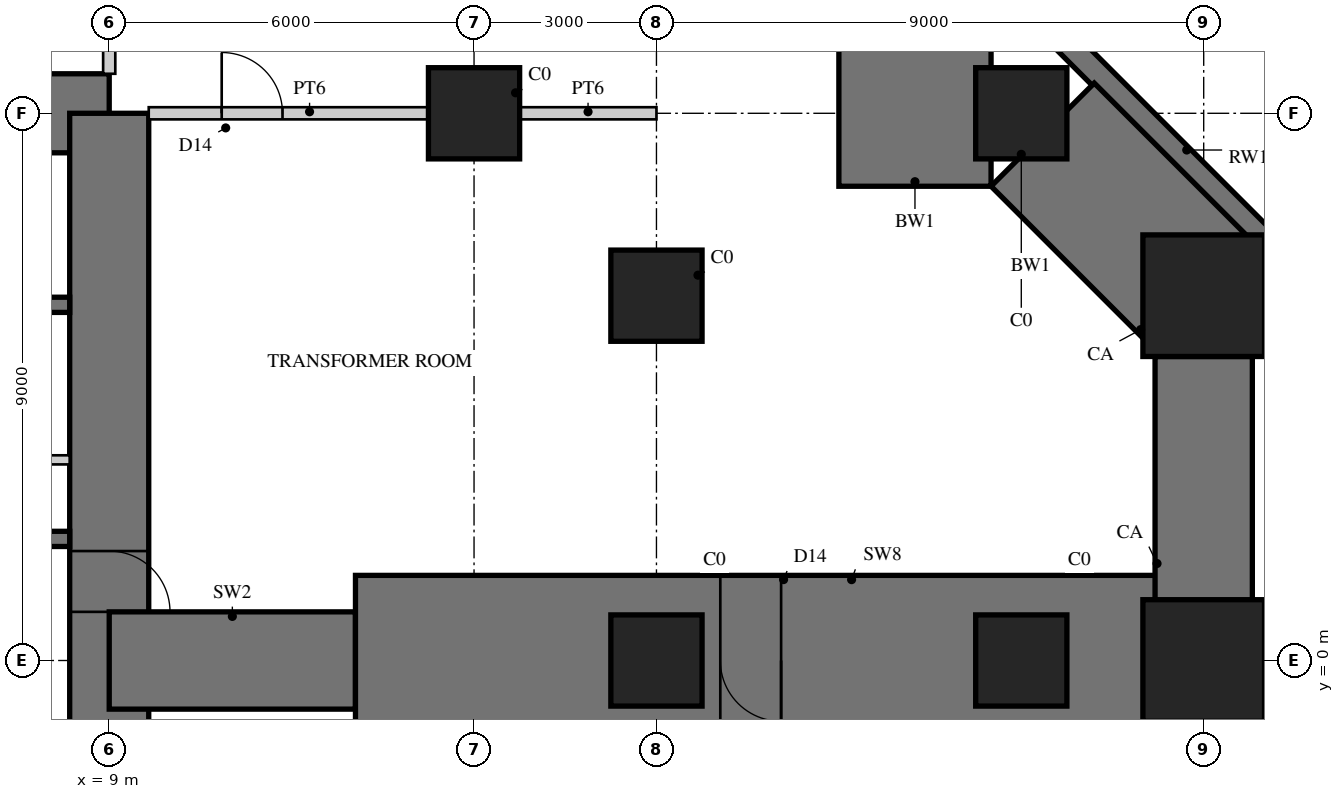
"""IFC4 building model, lengths in metres.
Left out: names, types, materials, properties, quantities, classifications, styles, units other than length and angle.
Written with IfcOpenShell. Run it as: python <this file> out.ifc"""

import sys

from ifc_helpers import new_model, si_unit, direction, frame, frame_2d, origin, origin_2d, place, context, subcontext, project, spatial, polyline, rectangle, outline, extrude, element, fill, save


model = new_model("IFC4")
c1 = context("Model", 3, precision=1e-05, world=origin(), true_north=direction((0.0, 1.0)))
c2 = subcontext(c1, "Body", "Model", "MODEL_VIEW")
j1 = project(units=[si_unit("LENGTHUNIT", "METRE"), si_unit("PLANEANGLEUNIT", "RADIAN")], contexts=[c1])
p1 = place(None, origin())
s1 = spatial("IfcSite", under=j1, at=p1, CompositionType="ELEMENT")
p2 = place(p1, origin())
s2 = spatial("IfcBuilding", under=s1, at=p2, CompositionType="ELEMENT")
p3 = place(p2, frame((0.0, 0.0, -8.0)))
s3 = spatial("IfcBuildingStorey", under=s2, at=p3, CompositionType="ELEMENT", Elevation=-8.0)
p4 = place(p3, origin())
e1 = element("IfcWall", 1, at=p4, inside=s3, PredefinedType="SOLIDWALL", context=c2, shape_type="SweptSolid", body=[
    extrude(outline(polyline([(24.476, 10.15), (24.642, 10.55), (28.55, 6.642), (28.15, 6.476), (24.476, 10.15)])), origin(), (0.0, 0.0, 1.0), 4.0),
])
p5 = place(p3, frame((9.0, 9.0, 0.0), z_axis=(0.0, 0.0, 1.0), x_axis=(-1.0, 0.0, 0.0)))
e2 = element("IfcWall", 2, at=p5, inside=s3, PredefinedType="SHEAR", context=c2, shape_type="SweptSolid", body=[
    extrude(rectangle(XDim=18.0, YDim=1.3, at=frame_2d((9.0, 0.0))), origin(), (0.0, 0.0, 1.0), 4.0),
])
p6 = place(p5, frame((9.8, 0.0, 0.0)))
e3 = element("IfcOpeningElement", 3, at=p6, cuts=e2, PredefinedType="OPENING", context=c2, shape_type="SweptSolid", body=[
    extrude(rectangle(XDim=1.0, YDim=2.4, at=frame_2d((0.5, 1.2))), frame((0.0, 0.66, 0.0), z_axis=(0.0, -1.0, 0.0), x_axis=(1.0, 0.0, 0.0)), (0.0, 0.0, 1.0), 1.32),
])
p7 = place(p3, frame((9.0, -9.0, 0.0), z_axis=(0.0, 0.0, 1.0), x_axis=(0.0, 1.0, 0.0)))
e4 = element("IfcWall", 4, at=p7, inside=s3, PredefinedType="SHEAR", context=c2, shape_type="SweptSolid", body=[
    extrude(rectangle(XDim=18.0, YDim=1.3, at=frame_2d((9.0, 0.0))), origin(), (0.0, 0.0, 1.0), 4.0),
])
p8 = place(p7, frame((9.8, 0.0, 0.0)))
e5 = element("IfcOpeningElement", 5, at=p8, cuts=e4, PredefinedType="OPENING", context=c2, shape_type="SweptSolid", body=[
    extrude(rectangle(XDim=1.0, YDim=2.4, at=frame_2d((0.5, 1.2))), frame((0.0, 0.66, 0.0), z_axis=(0.0, -1.0, 0.0), x_axis=(1.0, 0.0, 0.0)), (0.0, 0.0, 1.0), 1.32),
])
for number, where, z_axis, x_axis in (
    (6, (1.925, 2.0, 0.0), (0.0, 0.0, 1.0), (1.0, 0.0, 0.0)),
    (7, (1.925, 5.85, 0.0), (0.0, 0.0, 1.0), (1.0, 0.0, 0.0)),
):
    element("IfcWall", number, at=place(p3, frame(where, z_axis=z_axis, x_axis=x_axis)), inside=s3, PredefinedType="SHEAR", context=c2, shape_type="SweptSolid", body=[
        extrude(rectangle(XDim=6.425, YDim=0.25, at=frame_2d((3.212, 0.0))), origin(), (0.0, 0.0, 1.0), 4.0),
    ])
p9 = place(p3, frame((1.925, 3.3, 0.0), z_axis=(0.0, 0.0, 1.0), x_axis=(1.0, 0.0, 0.0)))
e8 = element("IfcWall", 8, at=p9, inside=s3, PredefinedType="PARTITIONING", context=c2, shape_type="SweptSolid", body=[
    extrude(rectangle(XDim=6.425, YDim=0.15, at=frame_2d((3.212, 0.0))), origin(), (0.0, 0.0, 1.0), 4.0),
])
p10 = place(p9, frame((0.075, 0.0, 0.0)))
e9 = element("IfcOpeningElement", 9, at=p10, cuts=e8, PredefinedType="OPENING", context=c2, shape_type="SweptSolid", body=[
    extrude(rectangle(XDim=0.8, YDim=2.1, at=frame_2d((0.4, 1.05))), frame((0.0, 0.085, 0.0), z_axis=(0.0, -1.0, 0.0), x_axis=(1.0, 0.0, 0.0)), (0.0, 0.0, 1.0), 0.17),
])
p11 = place(p9, frame((3.675, 0.0, 0.0)))
e10 = element("IfcOpeningElement", 10, at=p11, cuts=e8, PredefinedType="OPENING", context=c2, shape_type="SweptSolid", body=[
    extrude(rectangle(XDim=0.8, YDim=2.1, at=frame_2d((0.4, 1.05))), frame((0.0, 0.085, 0.0), z_axis=(0.0, -1.0, 0.0), x_axis=(1.0, 0.0, 0.0)), (0.0, 0.0, 1.0), 0.17),
])
p12 = place(p3, frame((9.0, 0.0, 0.0), z_axis=(0.0, 0.0, 1.0), x_axis=(1.0, 0.0, 0.0)))
e11 = element("IfcWall", 11, at=p12, inside=s3, PredefinedType="SHEAR", context=c2, shape_type="SweptSolid", body=[
    extrude(rectangle(XDim=4.05, YDim=1.6, at=frame_2d((2.025, 0.0))), origin(), (0.0, 0.0, 1.0), 4.0),
])
p13 = place(p3, frame((13.05, 0.0, 0.0), z_axis=(0.0, 0.0, 1.0), x_axis=(1.0, 0.0, 0.0)))
e12 = element("IfcWall", 12, at=p13, inside=s3, PredefinedType="SHEAR", context=c2, shape_type="SweptSolid", body=[
    extrude(rectangle(XDim=13.95, YDim=2.8, at=frame_2d((6.975, 0.0))), origin(), (0.0, 0.0, 1.0), 4.0),
])
p14 = place(p13, frame((6.0, 0.0, 0.0)))
e13 = element("IfcOpeningElement", 13, at=p14, cuts=e12, PredefinedType="OPENING", context=c2, shape_type="SweptSolid", body=[
    extrude(rectangle(XDim=1.0, YDim=2.2, at=frame_2d((0.5, 1.1))), frame((0.0, 1.41, 0.0), z_axis=(0.0, -1.0, 0.0), x_axis=(1.0, 0.0, 0.0)), (0.0, 0.0, 1.0), 2.82),
])
p15 = place(p3, frame((21.0, 9.0, 0.0), z_axis=(0.0, 0.0, 1.0), x_axis=(1.0, 0.0, 0.0)))
e14 = element("IfcWall", 14, at=p15, inside=s3, PredefinedType="SHEAR", context=c2, shape_type="SweptSolid", body=[
    extrude(rectangle(XDim=2.503, YDim=2.4, at=frame_2d((1.251, 0.0))), origin(), (0.0, 0.0, 1.0), 4.0),
])
p16 = place(p3, frame((24.352, 8.648, 0.0), z_axis=(0.0, 0.0, 1.0), x_axis=(0.707106781187, -0.707106781187, 0.0)))
e15 = element("IfcWall", 15, at=p16, inside=s3, PredefinedType="SHEAR", context=c2, shape_type="SweptSolid", body=[
    extrude(rectangle(XDim=3.745, YDim=2.4, at=frame_2d((1.873, 0.0))), origin(), (0.0, 0.0, 1.0), 4.0),
])
p17 = place(p3, frame((27.0, -5.0, 0.0), z_axis=(0.0, 0.0, 1.0), x_axis=(0.0, 1.0, 0.0)))
e16 = element("IfcWall", 16, at=p17, inside=s3, PredefinedType="SHEAR", context=c2, shape_type="SweptSolid", body=[
    extrude(rectangle(XDim=10.0, YDim=1.6, at=frame_2d((5.0, 0.0))), origin(), (0.0, 0.0, 1.0), 4.0),
])
for number, where, z_axis, x_axis in (
    (17, (15.0, 9.0, 0.0), (0.0, 0.0, 1.0), (1.0, 0.0, 0.0)),
    (18, (24.0, 9.0, 0.0), (0.0, 0.0, 1.0), (1.0, 0.0, 0.0)),
):
    element("IfcColumn", number, at=place(p3, frame(where, z_axis=z_axis, x_axis=x_axis)), inside=s3, PredefinedType="COLUMN", context=c2, shape_type="SweptSolid", body=[
        extrude(rectangle(XDim=1.5, YDim=1.5, at=origin_2d()), origin(), (0.0, 0.0, 1.0), 4.0),
    ])
for number, where, z_axis, x_axis in (
    (19, (27.0, 0.0, 0.0), (0.0, 0.0, 1.0), (1.0, 0.0, 0.0)),
    (20, (27.0, 6.0, 0.0), (0.0, 0.0, 1.0), (1.0, 0.0, 0.0)),
):
    element("IfcColumn", number, at=place(p3, frame(where, z_axis=z_axis, x_axis=x_axis)), inside=s3, PredefinedType="COLUMN", context=c2, shape_type="SweptSolid", body=[
        extrude(rectangle(XDim=2.0, YDim=2.0, at=origin_2d()), origin(), (0.0, 0.0, 1.0), 4.0),
    ])
for number, where, z_axis, x_axis in (
    (21, (18.0, 0.0, 0.0), (0.0, 0.0, 1.0), (1.0, 0.0, 0.0)),
    (22, (18.0, 6.0, 0.0), (0.0, 0.0, 1.0), (1.0, 0.0, 0.0)),
    (23, (24.0, 0.0, 0.0), (0.0, 0.0, 1.0), (1.0, 0.0, 0.0)),
):
    element("IfcColumn", number, at=place(p3, frame(where, z_axis=z_axis, x_axis=x_axis)), inside=s3, PredefinedType="COLUMN", context=c2, shape_type="SweptSolid", body=[
        extrude(rectangle(XDim=1.5, YDim=1.5, at=origin_2d()), origin(), (0.0, 0.0, 1.0), 4.0),
    ])
p18 = place(p3, frame((9.65, 9.0, 0.0), z_axis=(0.0, 0.0, 1.0), x_axis=(1.0, 0.0, 0.0)))
e24 = element("IfcWall", 24, at=p18, inside=s3, PredefinedType="SOLIDWALL", context=c2, shape_type="SweptSolid", body=[
    extrude(rectangle(XDim=4.6, YDim=0.2, at=frame_2d((2.3, 0.0))), origin(), (0.0, 0.0, 1.0), 2.75),
])
p19 = place(p18, frame((1.2, 0.0, 0.0)))
e25 = element("IfcOpeningElement", 25, at=p19, cuts=e24, PredefinedType="OPENING", context=c2, shape_type="SweptSolid", body=[
    extrude(rectangle(XDim=1.0, YDim=2.2, at=frame_2d((0.5, 1.1))), frame((0.0, 0.11, 0.0), z_axis=(0.0, -1.0, 0.0), x_axis=(1.0, 0.0, 0.0)), (0.0, 0.0, 1.0), 0.22),
])
p20 = place(p3, frame((15.75, 9.0, 0.0), z_axis=(0.0, 0.0, 1.0), x_axis=(1.0, 0.0, 0.0)))
e26 = element("IfcWall", 26, at=p20, inside=s3, PredefinedType="SOLIDWALL", context=c2, shape_type="SweptSolid", body=[
    extrude(rectangle(XDim=2.25, YDim=0.2, at=frame_2d((1.125, 0.0))), origin(), (0.0, 0.0, 1.0), 2.75),
])
p21 = place(p3, frame((9.0, 14.25, 0.0), z_axis=(0.0, 0.0, 1.0), x_axis=(0.0, -1.0, 0.0)))
e27 = element("IfcWall", 27, at=p21, inside=s3, PredefinedType="SOLIDWALL", context=c2, shape_type="SweptSolid", body=[
    extrude(rectangle(XDim=4.6, YDim=0.2, at=frame_2d((2.3, 0.0))), origin(), (0.0, 0.0, 1.0), 2.75),
])
p22 = place(p19, origin())
e28 = element("IfcDoor", 28, at=p22, inside=s3, OperationType="SINGLE_SWING_LEFT", PredefinedType="DOOR", context=c2, shape_type="SweptSolid", body=[
    extrude(rectangle(XDim=1.0, YDim=2.2, at=frame_2d((0.5, 1.1))), frame((0.0, 0.025, 0.0), z_axis=(0.0, -1.0, 0.0), x_axis=(1.0, 0.0, 0.0)), (0.0, 0.0, 1.0), 0.05),
])
fill(e25, e28)
p23 = place(p14, frame((1.0, 0.0, 0.0), z_axis=(0.0, 0.0, 1.0), x_axis=(-1.0, 0.0, 0.0)))
e29 = element("IfcDoor", 29, at=p23, inside=s3, OperationType="SINGLE_SWING_LEFT", PredefinedType="DOOR", context=c2, shape_type="SweptSolid", body=[
    extrude(rectangle(XDim=1.0, YDim=2.2, at=frame_2d((0.5, 1.1))), frame((0.0, 0.025, 0.0), z_axis=(0.0, -1.0, 0.0), x_axis=(1.0, 0.0, 0.0)), (0.0, 0.0, 1.0), 0.05),
])
fill(e13, e29)
p24 = place(p8, frame((1.0, 0.0, 0.0), z_axis=(0.0, 0.0, 1.0), x_axis=(-1.0, 0.0, 0.0)))
e30 = element("IfcDoor", 30, at=p24, inside=s3, OperationType="SINGLE_SWING_RIGHT", PredefinedType="DOOR", context=c2, shape_type="SweptSolid", body=[
    extrude(rectangle(XDim=1.0, YDim=2.4, at=frame_2d((0.5, 1.2))), frame((0.0, -0.005, 0.0), z_axis=(0.0, -1.0, 0.0), x_axis=(1.0, 0.0, 0.0)), (0.0, 0.0, 1.0), 0.05),
])
fill(e5, e30)
save(model, sys.argv[1])
